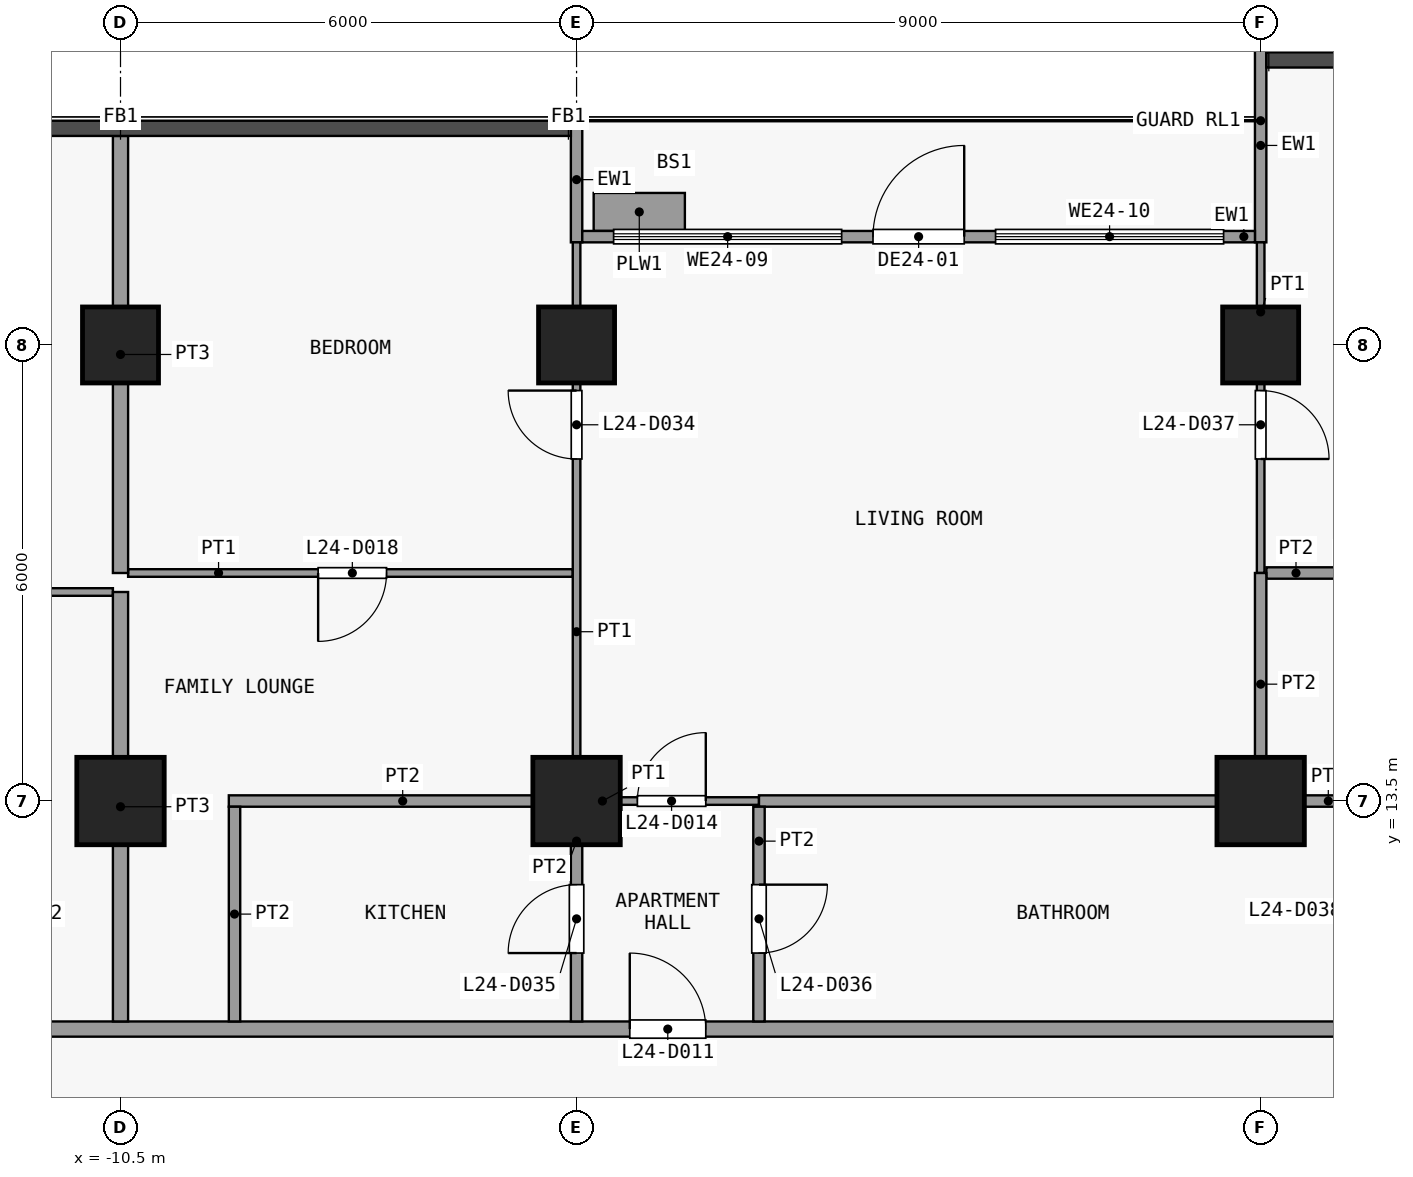
"""IFC4 building model, lengths in metres.
Left out: names, types, materials, properties, quantities, classifications, styles, units other than length and angle.
Written with IfcOpenShell. Run it as: python <this file> out.ifc"""

import sys

from ifc_helpers import new_model, si_unit, direction, frame, frame_2d, origin, origin_2d, place, context, subcontext, project, spatial, rectangle, extrude, element, fill, save


model = new_model("IFC4")
c1 = context("Model", 3, precision=1e-05, world=origin(), true_north=direction((0.0, 1.0)))
c2 = subcontext(c1, "Body", "Model", "MODEL_VIEW")
j1 = project(units=[si_unit("LENGTHUNIT", "METRE"), si_unit("PLANEANGLEUNIT", "RADIAN")], contexts=[c1])
p1 = place(None, origin())
s1 = spatial("IfcSite", under=j1, at=p1, CompositionType="ELEMENT")
p2 = place(p1, origin())
s2 = spatial("IfcBuilding", under=s1, at=p2, CompositionType="ELEMENT")
p3 = place(p2, frame((0.0, 0.0, 99.1)))
s3 = spatial("IfcBuildingStorey", under=s2, at=p3, CompositionType="ELEMENT", Elevation=99.1)
p4 = place(p3, frame((-10.5, 13.5, 0.0), z_axis=(0.0, 0.0, 1.0), x_axis=(1.0, 0.0, 0.0)))
e1 = element("IfcColumn", 1, at=p4, inside=s3, PredefinedType="COLUMN", context=c2, shape_type="SweptSolid", body=[
    extrude(rectangle(XDim=1.15, YDim=1.15, at=origin_2d()), origin(), (0.0, 0.0, 1.0), 3.6),
])
p5 = place(p3, frame((-10.5, 19.5, 0.0), z_axis=(0.0, 0.0, 1.0), x_axis=(1.0, 0.0, 0.0)))
e2 = element("IfcColumn", 2, at=p5, inside=s3, PredefinedType="COLUMN", context=c2, shape_type="SweptSolid", body=[
    extrude(rectangle(XDim=1.0, YDim=1.0, at=origin_2d()), origin(), (0.0, 0.0, 1.0), 3.6),
])
p6 = place(p3, frame((-4.5, 13.5, 0.0), z_axis=(0.0, 0.0, 1.0), x_axis=(1.0, 0.0, 0.0)))
e3 = element("IfcColumn", 3, at=p6, inside=s3, PredefinedType="COLUMN", context=c2, shape_type="SweptSolid", body=[
    extrude(rectangle(XDim=1.15, YDim=1.15, at=origin_2d()), origin(), (0.0, 0.0, 1.0), 3.6),
])
p7 = place(p3, frame((-4.5, 19.5, 0.0), z_axis=(0.0, 0.0, 1.0), x_axis=(1.0, 0.0, 0.0)))
e4 = element("IfcColumn", 4, at=p7, inside=s3, PredefinedType="COLUMN", context=c2, shape_type="SweptSolid", body=[
    extrude(rectangle(XDim=1.0, YDim=1.0, at=origin_2d()), origin(), (0.0, 0.0, 1.0), 3.6),
])
p8 = place(p3, frame((4.5, 13.5, 0.0), z_axis=(0.0, 0.0, 1.0), x_axis=(1.0, 0.0, 0.0)))
e5 = element("IfcColumn", 5, at=p8, inside=s3, PredefinedType="COLUMN", context=c2, shape_type="SweptSolid", body=[
    extrude(rectangle(XDim=1.15, YDim=1.15, at=origin_2d()), origin(), (0.0, 0.0, 1.0), 3.6),
])
p9 = place(p3, frame((4.5, 19.5, 0.0), z_axis=(0.0, 0.0, 1.0), x_axis=(1.0, 0.0, 0.0)))
e6 = element("IfcColumn", 6, at=p9, inside=s3, PredefinedType="COLUMN", context=c2, shape_type="SweptSolid", body=[
    extrude(rectangle(XDim=1.0, YDim=1.0, at=origin_2d()), origin(), (0.0, 0.0, 1.0), 3.6),
])
p10 = place(p3, frame((-4.5, 20.85, 0.0), z_axis=(0.0, 0.0, 1.0), x_axis=(0.0, 1.0, 0.0)))
e7 = element("IfcWall", 7, at=p10, inside=s3, PredefinedType="SOLIDWALL", context=c2, shape_type="SweptSolid", body=[
    extrude(rectangle(XDim=1.65, YDim=0.15, at=frame_2d((0.825, 0.0))), origin(), (0.0, 0.0, 1.0), 3.3),
])
p11 = place(p3, frame((4.5, 20.85, 0.0), z_axis=(0.0, 0.0, 1.0), x_axis=(0.0, 1.0, 0.0)))
e8 = element("IfcWall", 8, at=p11, inside=s3, PredefinedType="SOLIDWALL", context=c2, shape_type="SweptSolid", body=[
    extrude(rectangle(XDim=2.55, YDim=0.15, at=frame_2d((1.275, 0.0))), origin(), (0.0, 0.0, 1.0), 3.3),
])
p12 = place(p3, frame((-4.425, 20.925, 0.0), z_axis=(0.0, 0.0, 1.0), x_axis=(1.0, 0.0, 0.0)))
e9 = element("IfcWall", 9, at=p12, inside=s3, PredefinedType="SOLIDWALL", context=c2, shape_type="SweptSolid", body=[
    extrude(rectangle(XDim=8.85, YDim=0.15, at=frame_2d((4.425, 0.0))), origin(), (0.0, 0.0, 1.0), 3.3),
])
p13 = place(p12, frame((3.825, 0.0, 0.0)))
e10 = element("IfcOpeningElement", 10, at=p13, cuts=e9, PredefinedType="OPENING", context=c2, shape_type="SweptSolid", body=[
    extrude(rectangle(XDim=1.2, YDim=2.4, at=frame_2d((0.6, 1.2))), frame((0.0, 0.085, 0.0), z_axis=(0.0, -1.0, 0.0), x_axis=(1.0, 0.0, 0.0)), (0.0, 0.0, 1.0), 0.17),
])
p14 = place(p12, frame((0.413, 0.0, 0.9)))
e11 = element("IfcOpeningElement", 11, at=p14, cuts=e9, PredefinedType="OPENING", context=c2, shape_type="SweptSolid", body=[
    extrude(rectangle(XDim=3.0, YDim=2.1, at=frame_2d((1.5, 1.05))), frame((0.0, 0.085, 0.0), z_axis=(0.0, -1.0, 0.0), x_axis=(1.0, 0.0, 0.0)), (0.0, 0.0, 1.0), 0.17),
])
p15 = place(p12, frame((5.438, 0.0, 0.9)))
e12 = element("IfcOpeningElement", 12, at=p15, cuts=e9, PredefinedType="OPENING", context=c2, shape_type="SweptSolid", body=[
    extrude(rectangle(XDim=3.0, YDim=2.1, at=frame_2d((1.5, 1.05))), frame((0.0, 0.085, 0.0), z_axis=(0.0, -1.0, 0.0), x_axis=(1.0, 0.0, 0.0)), (0.0, 0.0, 1.0), 0.17),
])
p16 = place(p3, frame((-4.275, 21.25, 0.0), z_axis=(0.0, 0.0, 1.0), x_axis=(1.0, 0.0, 0.0)))
e13 = element("IfcWall", 13, at=p16, inside=s3, PredefinedType="USERDEFINED", context=c2, shape_type="SweptSolid", body=[
    extrude(rectangle(XDim=1.2, YDim=0.5, at=frame_2d((0.6, 0.0))), origin(), (0.0, 0.0, 1.0), 0.9),
])
p17 = place(p3, frame((-25.35, 10.5, 0.0), z_axis=(0.0, 0.0, 1.0), x_axis=(1.0, 0.0, 0.0)))
e14 = element("IfcWall", 14, at=p17, inside=s3, PredefinedType="PARTITIONING", context=c2, shape_type="SweptSolid", body=[
    extrude(rectangle(XDim=49.2, YDim=0.2, at=frame_2d((24.6, 0.0))), origin(), (0.0, 0.0, 1.0), 3.3),
])
p18 = place(p17, frame((7.05, 0.0, 0.0)))
e15 = element("IfcOpeningElement", 15, at=p18, cuts=e14, PredefinedType="OPENING", context=c2, shape_type="SweptSolid", body=[
    extrude(rectangle(XDim=1.0, YDim=2.1, at=frame_2d((0.5, 1.05))), frame((0.0, 0.11, 0.0), z_axis=(0.0, -1.0, 0.0), x_axis=(1.0, 0.0, 0.0)), (0.0, 0.0, 1.0), 0.22),
])
p19 = place(p17, frame((21.55, 0.0, 0.0)))
e16 = element("IfcOpeningElement", 16, at=p19, cuts=e14, PredefinedType="OPENING", context=c2, shape_type="SweptSolid", body=[
    extrude(rectangle(XDim=1.0, YDim=2.1, at=frame_2d((0.5, 1.05))), frame((0.0, 0.11, 0.0), z_axis=(0.0, -1.0, 0.0), x_axis=(1.0, 0.0, 0.0)), (0.0, 0.0, 1.0), 0.22),
])
p20 = place(p17, frame((45.05, 0.0, 0.0)))
e17 = element("IfcOpeningElement", 17, at=p20, cuts=e14, PredefinedType="OPENING", context=c2, shape_type="SweptSolid", body=[
    extrude(rectangle(XDim=1.0, YDim=2.1, at=frame_2d((0.5, 1.05))), frame((0.0, 0.11, 0.0), z_axis=(0.0, -1.0, 0.0), x_axis=(1.0, 0.0, 0.0)), (0.0, 0.0, 1.0), 0.22),
])
p21 = place(p3, frame((-4.5, 13.5, 0.0), z_axis=(0.0, 0.0, 1.0), x_axis=(1.0, 0.0, 0.0)))
e18 = element("IfcWall", 18, at=p21, inside=s3, PredefinedType="PARTITIONING", context=c2, shape_type="SweptSolid", body=[
    extrude(rectangle(XDim=2.4, YDim=0.1, at=frame_2d((1.2, 0.0))), origin(), (0.0, 0.0, 1.0), 3.3),
])
p22 = place(p21, frame((0.8, 0.0, 0.0)))
e19 = element("IfcOpeningElement", 19, at=p22, cuts=e18, PredefinedType="OPENING", context=c2, shape_type="SweptSolid", body=[
    extrude(rectangle(XDim=0.9, YDim=2.1, at=frame_2d((0.45, 1.05))), frame((0.0, 0.06, 0.0), z_axis=(0.0, -1.0, 0.0), x_axis=(1.0, 0.0, 0.0)), (0.0, 0.0, 1.0), 0.12),
])
p23 = place(p3, frame((-9.075, 13.5, 0.0), z_axis=(0.0, 0.0, 1.0), x_axis=(1.0, 0.0, 0.0)))
e20 = element("IfcWall", 20, at=p23, inside=s3, PredefinedType="PARTITIONING", context=c2, shape_type="SweptSolid", body=[
    extrude(rectangle(XDim=4.575, YDim=0.15, at=frame_2d((2.288, 0.0))), origin(), (0.0, 0.0, 1.0), 3.3),
])
p24 = place(p3, frame((-2.1, 13.5, 0.0), z_axis=(0.0, 0.0, 1.0), x_axis=(1.0, 0.0, 0.0)))
e21 = element("IfcWall", 21, at=p24, inside=s3, PredefinedType="PARTITIONING", context=c2, shape_type="SweptSolid", body=[
    extrude(rectangle(XDim=21.1, YDim=0.15, at=frame_2d((10.55, 0.0))), origin(), (0.0, 0.0, 1.0), 3.3),
])
p25 = place(p24, frame((15.1, 0.0, 0.0)))
e22 = element("IfcOpeningElement", 22, at=p25, cuts=e21, PredefinedType="OPENING", context=c2, shape_type="SweptSolid", body=[
    extrude(rectangle(XDim=0.9, YDim=2.1, at=frame_2d((0.45, 1.05))), frame((0.0, 0.085, 0.0), z_axis=(0.0, -1.0, 0.0), x_axis=(1.0, 0.0, 0.0)), (0.0, 0.0, 1.0), 0.17),
])
p26 = place(p3, frame((-16.45, 16.25, 0.0), z_axis=(0.0, 0.0, 1.0), x_axis=(1.0, 0.0, 0.0)))
e23 = element("IfcWall", 23, at=p26, inside=s3, PredefinedType="PARTITIONING", context=c2, shape_type="SweptSolid", body=[
    extrude(rectangle(XDim=5.85, YDim=0.1, at=frame_2d((2.925, 0.0))), origin(), (0.0, 0.0, 1.0), 3.3),
])
p27 = place(p26, frame((2.5, 0.0, 0.0)))
e24 = element("IfcOpeningElement", 24, at=p27, cuts=e23, PredefinedType="OPENING", context=c2, shape_type="SweptSolid", body=[
    extrude(rectangle(XDim=0.9, YDim=2.1, at=frame_2d((0.45, 1.05))), frame((0.0, 0.06, 0.0), z_axis=(0.0, -1.0, 0.0), x_axis=(1.0, 0.0, 0.0)), (0.0, 0.0, 1.0), 0.12),
])
p28 = place(p3, frame((-10.4, 16.5, 0.0), z_axis=(0.0, 0.0, 1.0), x_axis=(1.0, 0.0, 0.0)))
e25 = element("IfcWall", 25, at=p28, inside=s3, PredefinedType="PARTITIONING", context=c2, shape_type="SweptSolid", body=[
    extrude(rectangle(XDim=5.85, YDim=0.1, at=frame_2d((2.925, 0.0))), origin(), (0.0, 0.0, 1.0), 3.3),
])
p29 = place(p28, frame((2.5, 0.0, 0.0)))
e26 = element("IfcOpeningElement", 26, at=p29, cuts=e25, PredefinedType="OPENING", context=c2, shape_type="SweptSolid", body=[
    extrude(rectangle(XDim=0.9, YDim=2.1, at=frame_2d((0.45, 1.05))), frame((0.0, 0.06, 0.0), z_axis=(0.0, -1.0, 0.0), x_axis=(1.0, 0.0, 0.0)), (0.0, 0.0, 1.0), 0.12),
])
p30 = place(p3, frame((4.575, 16.5, 0.0), z_axis=(0.0, 0.0, 1.0), x_axis=(1.0, 0.0, 0.0)))
e27 = element("IfcWall", 27, at=p30, inside=s3, PredefinedType="PARTITIONING", context=c2, shape_type="SweptSolid", body=[
    extrude(rectangle(XDim=2.625, YDim=0.15, at=frame_2d((1.312, 0.0))), origin(), (0.0, 0.0, 1.0), 3.3),
])
p31 = place(p30, frame((0.9, 0.0, 0.0)))
e28 = element("IfcOpeningElement", 28, at=p31, cuts=e27, PredefinedType="OPENING", context=c2, shape_type="SweptSolid", body=[
    extrude(rectangle(XDim=0.9, YDim=2.1, at=frame_2d((0.45, 1.05))), frame((0.0, 0.085, 0.0), z_axis=(0.0, -1.0, 0.0), x_axis=(1.0, 0.0, 0.0)), (0.0, 0.0, 1.0), 0.17),
])
p32 = place(p3, frame((-10.5, 10.6, 0.0), z_axis=(0.0, 0.0, 1.0), x_axis=(0.0, 1.0, 0.0)))
e29 = element("IfcWall", 29, at=p32, inside=s3, PredefinedType="PARTITIONING", context=c2, shape_type="SweptSolid", body=[
    extrude(rectangle(XDim=5.65, YDim=0.2, at=frame_2d((2.825, 0.0))), origin(), (0.0, 0.0, 1.0), 3.3),
])
p33 = place(p3, frame((-10.5, 16.5, 0.0), z_axis=(0.0, 0.0, 1.0), x_axis=(0.0, 1.0, 0.0)))
e30 = element("IfcWall", 30, at=p33, inside=s3, PredefinedType="PARTITIONING", context=c2, shape_type="SweptSolid", body=[
    extrude(rectangle(XDim=5.75, YDim=0.2, at=frame_2d((2.875, 0.0))), origin(), (0.0, 0.0, 1.0), 3.3),
])
p34 = place(p3, frame((-9.0, 10.6, 0.0), z_axis=(0.0, 0.0, 1.0), x_axis=(0.0, 1.0, 0.0)))
e31 = element("IfcWall", 31, at=p34, inside=s3, PredefinedType="PARTITIONING", context=c2, shape_type="SweptSolid", body=[
    extrude(rectangle(XDim=2.825, YDim=0.15, at=frame_2d((1.413, 0.0))), origin(), (0.0, 0.0, 1.0), 3.3),
])
p35 = place(p3, frame((-4.5, 13.575, 0.0), z_axis=(0.0, 0.0, 1.0), x_axis=(0.0, 1.0, 0.0)))
e32 = element("IfcWall", 32, at=p35, inside=s3, PredefinedType="PARTITIONING", context=c2, shape_type="SweptSolid", body=[
    extrude(rectangle(XDim=7.275, YDim=0.1, at=frame_2d((3.638, 0.0))), origin(), (0.0, 0.0, 1.0), 3.3),
])
p36 = place(p35, frame((4.425, 0.0, 0.0)))
e33 = element("IfcOpeningElement", 33, at=p36, cuts=e32, PredefinedType="OPENING", context=c2, shape_type="SweptSolid", body=[
    extrude(rectangle(XDim=0.9, YDim=2.1, at=frame_2d((0.45, 1.05))), frame((0.0, 0.06, 0.0), z_axis=(0.0, -1.0, 0.0), x_axis=(1.0, 0.0, 0.0)), (0.0, 0.0, 1.0), 0.12),
])
p37 = place(p3, frame((-4.5, 10.6, 0.0), z_axis=(0.0, 0.0, 1.0), x_axis=(0.0, 1.0, 0.0)))
e34 = element("IfcWall", 34, at=p37, inside=s3, PredefinedType="PARTITIONING", context=c2, shape_type="SweptSolid", body=[
    extrude(rectangle(XDim=2.825, YDim=0.15, at=frame_2d((1.413, 0.0))), origin(), (0.0, 0.0, 1.0), 3.3),
])
p38 = place(p37, frame((0.9, 0.0, 0.0)))
e35 = element("IfcOpeningElement", 35, at=p38, cuts=e34, PredefinedType="OPENING", context=c2, shape_type="SweptSolid", body=[
    extrude(rectangle(XDim=0.9, YDim=2.1, at=frame_2d((0.45, 1.05))), frame((0.0, 0.085, 0.0), z_axis=(0.0, -1.0, 0.0), x_axis=(1.0, 0.0, 0.0)), (0.0, 0.0, 1.0), 0.17),
])
p39 = place(p3, frame((-2.1, 10.6, 0.0), z_axis=(0.0, 0.0, 1.0), x_axis=(0.0, 1.0, 0.0)))
e36 = element("IfcWall", 36, at=p39, inside=s3, PredefinedType="PARTITIONING", context=c2, shape_type="SweptSolid", body=[
    extrude(rectangle(XDim=2.825, YDim=0.15, at=frame_2d((1.413, 0.0))), origin(), (0.0, 0.0, 1.0), 3.3),
])
p40 = place(p39, frame((0.9, 0.0, 0.0)))
e37 = element("IfcOpeningElement", 37, at=p40, cuts=e36, PredefinedType="OPENING", context=c2, shape_type="SweptSolid", body=[
    extrude(rectangle(XDim=0.9, YDim=2.1, at=frame_2d((0.45, 1.05))), frame((0.0, 0.085, 0.0), z_axis=(0.0, -1.0, 0.0), x_axis=(1.0, 0.0, 0.0)), (0.0, 0.0, 1.0), 0.17),
])
p41 = place(p3, frame((4.5, 16.5, 0.0), z_axis=(0.0, 0.0, 1.0), x_axis=(0.0, 1.0, 0.0)))
e38 = element("IfcWall", 38, at=p41, inside=s3, PredefinedType="PARTITIONING", context=c2, shape_type="SweptSolid", body=[
    extrude(rectangle(XDim=4.35, YDim=0.1, at=frame_2d((2.175, 0.0))), origin(), (0.0, 0.0, 1.0), 3.3),
])
p42 = place(p41, frame((1.5, 0.0, 0.0)))
e39 = element("IfcOpeningElement", 39, at=p42, cuts=e38, PredefinedType="OPENING", context=c2, shape_type="SweptSolid", body=[
    extrude(rectangle(XDim=0.9, YDim=2.1, at=frame_2d((0.45, 1.05))), frame((0.0, 0.06, 0.0), z_axis=(0.0, -1.0, 0.0), x_axis=(1.0, 0.0, 0.0)), (0.0, 0.0, 1.0), 0.12),
])
p43 = place(p3, frame((4.5, 13.575, 0.0), z_axis=(0.0, 0.0, 1.0), x_axis=(0.0, 1.0, 0.0)))
e40 = element("IfcWall", 40, at=p43, inside=s3, PredefinedType="PARTITIONING", context=c2, shape_type="SweptSolid", body=[
    extrude(rectangle(XDim=2.925, YDim=0.15, at=frame_2d((1.462, 0.0))), origin(), (0.0, 0.0, 1.0), 3.3),
])
p44 = place(p13, origin())
e41 = element("IfcDoor", 41, at=p44, inside=s3, OperationType="SINGLE_SWING_RIGHT", PredefinedType="DOOR", context=c2, shape_type="SweptSolid", body=[
    extrude(rectangle(XDim=1.2, YDim=2.4, at=frame_2d((0.6, 1.2))), frame((0.0, 0.025, 0.0), z_axis=(0.0, -1.0, 0.0), x_axis=(1.0, 0.0, 0.0)), (0.0, 0.0, 1.0), 0.05),
])
fill(e10, e41)
p45 = place(p14, origin())
e42 = element("IfcWindow", 42, at=p45, inside=s3, PartitioningType="SINGLE_PANEL", PredefinedType="WINDOW", context=c2, shape_type="SweptSolid", body=[
    extrude(rectangle(XDim=3.0, YDim=2.1, at=frame_2d((1.5, 1.05))), frame((0.0, 0.03, 0.0), z_axis=(0.0, -1.0, 0.0), x_axis=(1.0, 0.0, 0.0)), (0.0, 0.0, 1.0), 0.06),
])
fill(e11, e42)
p46 = place(p15, origin())
e43 = element("IfcWindow", 43, at=p46, inside=s3, PartitioningType="SINGLE_PANEL", PredefinedType="WINDOW", context=c2, shape_type="SweptSolid", body=[
    extrude(rectangle(XDim=3.0, YDim=2.1, at=frame_2d((1.5, 1.05))), frame((0.0, 0.03, 0.0), z_axis=(0.0, -1.0, 0.0), x_axis=(1.0, 0.0, 0.0)), (0.0, 0.0, 1.0), 0.06),
])
fill(e12, e43)
p47 = place(p19, origin())
e44 = element("IfcDoor", 44, at=p47, inside=s3, OperationType="SINGLE_SWING_RIGHT", PredefinedType="DOOR", context=c2, shape_type="SweptSolid", body=[
    extrude(rectangle(XDim=1.0, YDim=2.1, at=frame_2d((0.5, 1.05))), frame((0.0, 0.025, 0.0), z_axis=(0.0, -1.0, 0.0), x_axis=(1.0, 0.0, 0.0)), (0.0, 0.0, 1.0), 0.05),
])
fill(e16, e44)
p48 = place(p22, origin())
e45 = element("IfcDoor", 45, at=p48, inside=s3, OperationType="SINGLE_SWING_LEFT", PredefinedType="DOOR", context=c2, shape_type="SweptSolid", body=[
    extrude(rectangle(XDim=0.9, YDim=2.1, at=frame_2d((0.45, 1.05))), frame((0.0, 0.025, 0.0), z_axis=(0.0, -1.0, 0.0), x_axis=(1.0, 0.0, 0.0)), (0.0, 0.0, 1.0), 0.05),
])
fill(e19, e45)
p49 = place(p29, origin())
e46 = element("IfcDoor", 46, at=p49, inside=s3, OperationType="SINGLE_SWING_LEFT", PredefinedType="DOOR", context=c2, shape_type="SweptSolid", body=[
    extrude(rectangle(XDim=0.9, YDim=2.1, at=frame_2d((0.45, 1.05))), frame((0.0, 0.025, 0.0), z_axis=(0.0, -1.0, 0.0), x_axis=(1.0, 0.0, 0.0)), (0.0, 0.0, 1.0), 0.05),
])
fill(e26, e46)
p50 = place(p36, origin())
e47 = element("IfcDoor", 47, at=p50, inside=s3, OperationType="SINGLE_SWING_LEFT", PredefinedType="DOOR", context=c2, shape_type="SweptSolid", body=[
    extrude(rectangle(XDim=0.9, YDim=2.1, at=frame_2d((0.45, 1.05))), frame((0.0, 0.025, 0.0), z_axis=(0.0, -1.0, 0.0), x_axis=(1.0, 0.0, 0.0)), (0.0, 0.0, 1.0), 0.05),
])
fill(e33, e47)
p51 = place(p38, origin())
e48 = element("IfcDoor", 48, at=p51, inside=s3, OperationType="SINGLE_SWING_RIGHT", PredefinedType="DOOR", context=c2, shape_type="SweptSolid", body=[
    extrude(rectangle(XDim=0.9, YDim=2.1, at=frame_2d((0.45, 1.05))), frame((0.0, 0.025, 0.0), z_axis=(0.0, -1.0, 0.0), x_axis=(1.0, 0.0, 0.0)), (0.0, 0.0, 1.0), 0.05),
])
fill(e35, e48)
p52 = place(p40, origin())
e49 = element("IfcDoor", 49, at=p52, inside=s3, OperationType="SINGLE_SWING_RIGHT", PredefinedType="DOOR", context=c2, shape_type="SweptSolid", body=[
    extrude(rectangle(XDim=0.9, YDim=2.1, at=frame_2d((0.45, 1.05))), frame((0.0, 0.025, 0.0), z_axis=(0.0, -1.0, 0.0), x_axis=(1.0, 0.0, 0.0)), (0.0, 0.0, 1.0), 0.05),
])
fill(e37, e49)
p53 = place(p42, origin())
e50 = element("IfcDoor", 50, at=p53, inside=s3, OperationType="SINGLE_SWING_LEFT", PredefinedType="DOOR", context=c2, shape_type="SweptSolid", body=[
    extrude(rectangle(XDim=0.9, YDim=2.1, at=frame_2d((0.45, 1.05))), frame((0.0, 0.025, 0.0), z_axis=(0.0, -1.0, 0.0), x_axis=(1.0, 0.0, 0.0)), (0.0, 0.0, 1.0), 0.05),
])
fill(e39, e50)
save(model, sys.argv[1])
